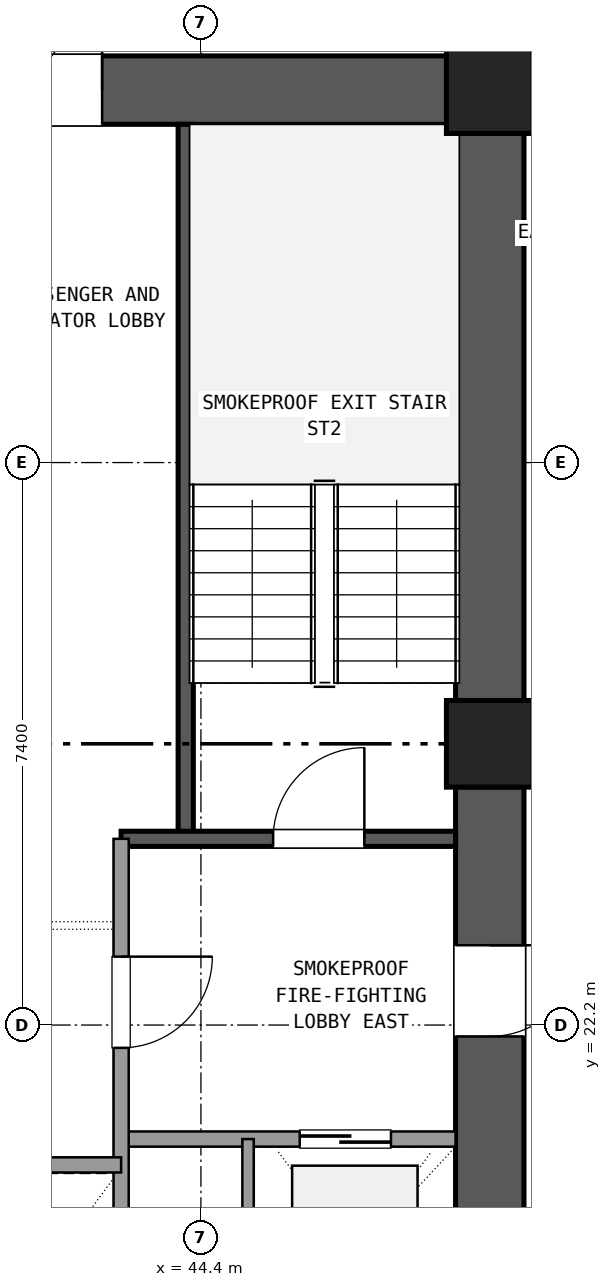
"""IFC4 building model, lengths in metres.
Left out: names, types, materials, properties, quantities, classifications, styles, units other than length and angle.
Written with IfcOpenShell. Run it as: python <this file> out.ifc"""

import sys

from ifc_helpers import new_model, si_unit, direction, frame, frame_2d, origin, origin_2d, place, context, subcontext, project, spatial, rectangle, extrude, element, fill, save


model = new_model("IFC4")
c1 = context("Model", 3, precision=1e-05, world=origin(), true_north=direction((0.0, 1.0)))
c2 = subcontext(c1, "Body", "Model", "MODEL_VIEW")
j1 = project(units=[si_unit("LENGTHUNIT", "METRE"), si_unit("PLANEANGLEUNIT", "RADIAN")], contexts=[c1])
p1 = place(None, origin())
s1 = spatial("IfcSite", under=j1, at=p1, CompositionType="ELEMENT")
p2 = place(p1, origin())
s2 = spatial("IfcBuilding", under=s1, at=p2, CompositionType="ELEMENT")
p3 = place(p2, frame((0.0, 0.0, 23.94)))
s3 = spatial("IfcBuildingStorey", under=s2, at=p3, CompositionType="ELEMENT", Elevation=23.94)
for number, where, z_axis, x_axis in (
    (1, (48.2, 25.9, 0.0), (0.0, 0.0, 1.0), (1.0, 0.0, 0.0)),
    (2, (48.2, 34.5, 0.0), (0.0, 0.0, 1.0), (1.0, 0.0, 0.0)),
):
    element("IfcColumn", number, at=place(p3, frame(where, z_axis=z_axis, x_axis=x_axis)), inside=s3, PredefinedType="COLUMN", context=c2, shape_type="SweptSolid", body=[
        extrude(rectangle(XDim=1.14, YDim=1.14, at=origin_2d()), origin(), (0.0, 0.0, 1.0), 3.6),
    ])
p4 = place(p3, frame((48.2, 17.865, 0.0), z_axis=(0.0, 0.0, 1.0), x_axis=(0.0, 1.0, 0.0)))
e3 = element("IfcWall", 3, at=p4, inside=s3, PredefinedType="SHEAR", context=c2, shape_type="SweptSolid", body=[
    extrude(rectangle(XDim=7.47, YDim=0.9, at=frame_2d((3.735, 0.0))), origin(), (0.0, 0.0, 1.0), 3.32),
])
p5 = place(p4, frame((4.185, 0.0, 0.0)))
e4 = element("IfcOpeningElement", 4, at=p5, cuts=e3, PredefinedType="OPENING", context=c2, shape_type="SweptSolid", body=[
    extrude(rectangle(XDim=1.2, YDim=2.15, at=frame_2d((0.6, 1.075))), frame((0.0, 0.46, 0.0), z_axis=(0.0, -1.0, 0.0), x_axis=(1.0, 0.0, 0.0)), (0.0, 0.0, 1.0), 0.92),
])
p6 = place(p3, frame((48.2, 26.465, 0.0), z_axis=(0.0, 0.0, 1.0), x_axis=(0.0, 1.0, 0.0)))
e5 = element("IfcWall", 5, at=p6, inside=s3, PredefinedType="SHEAR", context=c2, shape_type="SweptSolid", body=[
    extrude(rectangle(XDim=7.47, YDim=0.9, at=frame_2d((3.735, 0.0))), origin(), (0.0, 0.0, 1.0), 3.32),
])
p7 = place(p3, frame((47.635, 34.5, 0.0), z_axis=(0.0, 0.0, 1.0), x_axis=(-1.0, 0.0, 0.0)))
e6 = element("IfcWall", 6, at=p7, inside=s3, PredefinedType="SHEAR", context=c2, shape_type="SweptSolid", body=[
    extrude(rectangle(XDim=10.07, YDim=0.9, at=frame_2d((5.035, 0.0))), origin(), (0.0, 0.0, 1.0), 3.32),
])
p8 = place(p7, frame((4.535, 0.0, 0.0)))
e7 = element("IfcOpeningElement", 7, at=p8, cuts=e6, PredefinedType="OPENING", context=c2, shape_type="SweptSolid", body=[
    extrude(rectangle(XDim=1.6, YDim=2.2, at=frame_2d((0.8, 1.1))), frame((0.0, 0.46, 0.0), z_axis=(0.0, -1.0, 0.0), x_axis=(1.0, 0.0, 0.0)), (0.0, 0.0, 1.0), 0.92),
])
p9 = place(p3, frame((44.2, 24.65, 0.0), z_axis=(0.0, 0.0, 1.0), x_axis=(0.0, 1.0, 0.0)))
e8 = element("IfcWall", 8, at=p9, inside=s3, PredefinedType="SHEAR", context=c2, shape_type="SweptSolid", body=[
    extrude(rectangle(XDim=9.4, YDim=0.2, at=frame_2d((4.7, 0.0))), origin(), (0.0, 0.0, 1.0), 3.32),
])
p10 = place(p3, frame((43.35, 24.65, 0.0), z_axis=(0.0, 0.0, 1.0), x_axis=(1.0, 0.0, 0.0)))
e9 = element("IfcWall", 9, at=p10, inside=s3, PredefinedType="SHEAR", context=c2, shape_type="SweptSolid", body=[
    extrude(rectangle(XDim=4.4, YDim=0.2, at=frame_2d((2.2, 0.0))), origin(), (0.0, 0.0, 1.0), 3.32),
])
p11 = place(p10, frame((2.0, 0.0, 0.0)))
e10 = element("IfcOpeningElement", 10, at=p11, cuts=e9, PredefinedType="OPENING", context=c2, shape_type="SweptSolid", body=[
    extrude(rectangle(XDim=1.2, YDim=2.15, at=frame_2d((0.6, 1.075))), frame((0.0, 0.11, 0.0), z_axis=(0.0, -1.0, 0.0), x_axis=(1.0, 0.0, 0.0)), (0.0, 0.0, 1.0), 0.22),
])
p12 = place(p3, frame((43.35, 20.7, 0.0), z_axis=(0.0, 0.0, 1.0), x_axis=(1.0, 0.0, 0.0)))
e11 = element("IfcWall", 11, at=p12, inside=s3, PredefinedType="SOLIDWALL", context=c2, shape_type="SweptSolid", body=[
    extrude(rectangle(XDim=4.4, YDim=0.2, at=frame_2d((2.2, 0.0))), origin(), (0.0, 0.0, 1.0), 2.61),
])
p13 = place(p12, frame((2.35, 0.0, 0.0)))
e12 = element("IfcOpeningElement", 12, at=p13, cuts=e11, PredefinedType="OPENING", context=c2, shape_type="SweptSolid", body=[
    extrude(rectangle(XDim=1.2, YDim=2.15, at=frame_2d((0.6, 1.075))), frame((0.0, 0.11, 0.0), z_axis=(0.0, -1.0, 0.0), x_axis=(1.0, 0.0, 0.0)), (0.0, 0.0, 1.0), 0.22),
])
p14 = place(p3, frame((43.35, 17.75, 0.0), z_axis=(0.0, 0.0, 1.0), x_axis=(0.0, 1.0, 0.0)))
e13 = element("IfcWall", 13, at=p14, inside=s3, PredefinedType="SOLIDWALL", context=c2, shape_type="SweptSolid", body=[
    extrude(rectangle(XDim=6.9, YDim=0.2, at=frame_2d((3.45, 0.0))), origin(), (0.0, 0.0, 1.0), 2.61),
])
p15 = place(p14, frame((4.15, 0.0, 0.0)))
e14 = element("IfcOpeningElement", 14, at=p15, cuts=e13, PredefinedType="OPENING", context=c2, shape_type="SweptSolid", body=[
    extrude(rectangle(XDim=1.2, YDim=2.15, at=frame_2d((0.6, 1.075))), frame((0.0, 0.11, 0.0), z_axis=(0.0, -1.0, 0.0), x_axis=(1.0, 0.0, 0.0)), (0.0, 0.0, 1.0), 0.22),
])
p16 = place(p3, frame((45.02, 17.75, 0.0), z_axis=(0.0, 0.0, 1.0), x_axis=(0.0, 1.0, 0.0)))
e15 = element("IfcWall", 15, at=p16, inside=s3, PredefinedType="PARTITIONING", context=c2, shape_type="SweptSolid", body=[
    extrude(rectangle(XDim=2.95, YDim=0.15, at=frame_2d((1.475, 0.0))), origin(), (0.0, 0.0, 1.0), 2.61),
])
p17 = place(p3, frame((37.25, 20.36, 0.0), z_axis=(0.0, 0.0, 1.0), x_axis=(1.0, 0.0, 0.0)))
e16 = element("IfcWall", 16, at=p17, inside=s3, PredefinedType="SOLIDWALL", context=c2, shape_type="SweptSolid", body=[
    extrude(rectangle(XDim=6.1, YDim=0.2, at=frame_2d((3.05, 0.0))), origin(), (0.0, 0.0, 1.0), 2.61),
])
p18 = place(p11, origin())
e17 = element("IfcDoor", 17, at=p18, inside=s3, OperationType="SINGLE_SWING_RIGHT", PredefinedType="DOOR", context=c2, shape_type="SweptSolid", body=[
    extrude(rectangle(XDim=1.2, YDim=2.15, at=frame_2d((0.6, 1.075))), frame((0.0, 0.025, 0.0), z_axis=(0.0, -1.0, 0.0), x_axis=(1.0, 0.0, 0.0)), (0.0, 0.0, 1.0), 0.05),
])
fill(e10, e17)
p19 = place(p13, origin())
e18 = element("IfcDoor", 18, at=p19, inside=s3, OperationType="SLIDING_TO_RIGHT", PredefinedType="DOOR", context=c2, shape_type="SweptSolid", body=[
    extrude(rectangle(XDim=1.2, YDim=2.15, at=frame_2d((0.6, 1.075))), frame((0.0, 0.025, 0.0), z_axis=(0.0, -1.0, 0.0), x_axis=(1.0, 0.0, 0.0)), (0.0, 0.0, 1.0), 0.05),
])
fill(e12, e18)
p20 = place(p15, frame((1.2, 0.0, 0.0), z_axis=(0.0, 0.0, 1.0), x_axis=(-1.0, 0.0, 0.0)))
e19 = element("IfcDoor", 19, at=p20, inside=s3, OperationType="SINGLE_SWING_RIGHT", PredefinedType="DOOR", context=c2, shape_type="SweptSolid", body=[
    extrude(rectangle(XDim=1.2, YDim=2.15, at=frame_2d((0.6, 1.075))), frame((0.0, 0.025, 0.0), z_axis=(0.0, -1.0, 0.0), x_axis=(1.0, 0.0, 0.0)), (0.0, 0.0, 1.0), 0.05),
])
fill(e14, e19)
p21 = place(p5, frame((1.2, 0.0, 0.0), z_axis=(0.0, 0.0, 1.0), x_axis=(-1.0, 0.0, 0.0)))
e20 = element("IfcDoor", 20, at=p21, inside=s3, OperationType="SINGLE_SWING_RIGHT", PredefinedType="DOOR", context=c2, shape_type="SweptSolid", body=[
    extrude(rectangle(XDim=1.2, YDim=2.15, at=frame_2d((0.6, 1.075))), frame((0.0, 0.025, 0.0), z_axis=(0.0, -1.0, 0.0), x_axis=(1.0, 0.0, 0.0)), (0.0, 0.0, 1.0), 0.05),
])
fill(e4, e20)
p22 = place(p8, frame((1.6, 0.0, 0.0), z_axis=(0.0, 0.0, 1.0), x_axis=(-1.0, 0.0, 0.0)))
e21 = element("IfcDoor", 21, at=p22, inside=s3, OperationType="DOUBLE_DOOR_SINGLE_SWING", PredefinedType="DOOR", context=c2, shape_type="SweptSolid", body=[
    extrude(rectangle(XDim=1.6, YDim=2.2, at=frame_2d((0.8, 1.1))), frame((0.0, 0.025, 0.0), z_axis=(0.0, -1.0, 0.0), x_axis=(1.0, 0.0, 0.0)), (0.0, 0.0, 1.0), 0.05),
])
fill(e7, e21)
save(model, sys.argv[1])
